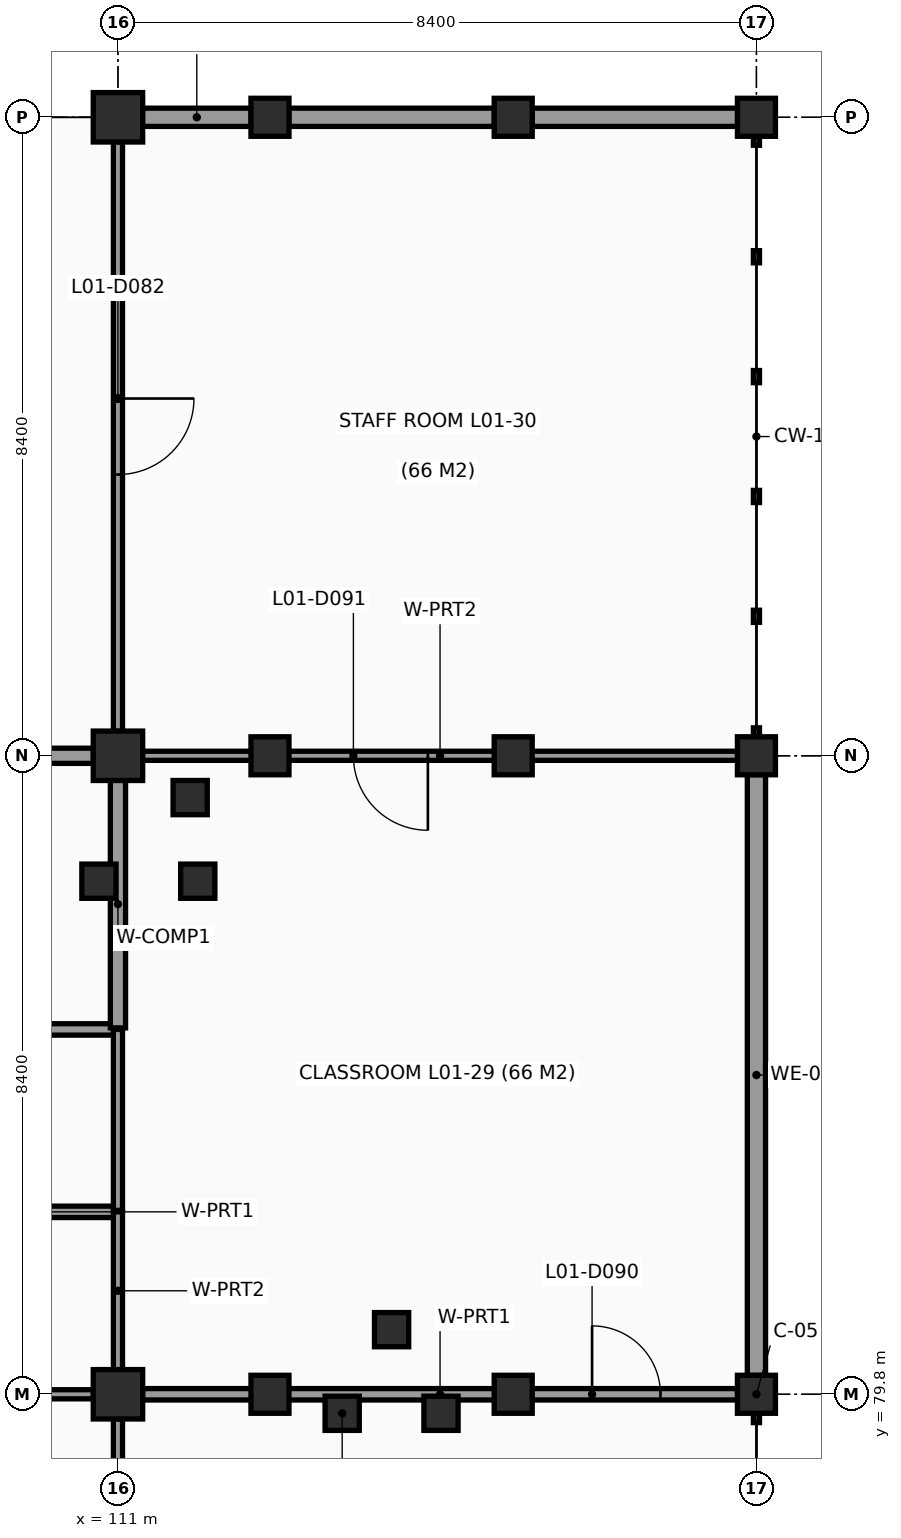
"""IFC4 building model, lengths in metres.
Left out: names, types, materials, properties, quantities, classifications, styles, units other than length and angle.
Written with IfcOpenShell. Run it as: python <this file> out.ifc"""

import sys

from ifc_helpers import new_model, si_unit, direction, frame, frame_2d, origin, origin_2d, place, context, subcontext, project, spatial, rectangle, extrude, element, fill, save


model = new_model("IFC4")
c1 = context("Model", 3, precision=1e-05, world=origin(), true_north=direction((0.0, 1.0)))
c2 = subcontext(c1, "Body", "Model", "MODEL_VIEW")
j1 = project(units=[si_unit("LENGTHUNIT", "METRE"), si_unit("PLANEANGLEUNIT", "RADIAN")], contexts=[c1])
p1 = place(None, origin())
s1 = spatial("IfcSite", under=j1, at=p1, CompositionType="ELEMENT")
p2 = place(p1, origin())
s2 = spatial("IfcBuilding", under=s1, at=p2, CompositionType="ELEMENT")
p3 = place(p2, frame((0.0, 0.0, 4.2)))
s3 = spatial("IfcBuildingStorey", under=s2, at=p3, CompositionType="ELEMENT", Elevation=4.2)
for number, where, z_axis, x_axis in (
    (1, (111.0, 79.8, 0.0), (0.0, 0.0, 1.0), (1.0, 0.0, 0.0)),
    (2, (111.0, 88.2, 0.0), (0.0, 0.0, 1.0), (1.0, 0.0, 0.0)),
    (3, (111.0, 96.6, 0.0), (0.0, 0.0, 1.0), (1.0, 0.0, 0.0)),
):
    element("IfcColumn", number, at=place(p3, frame(where, z_axis=z_axis, x_axis=x_axis)), inside=s3, PredefinedType="COLUMN", context=c2, shape_type="SweptSolid", body=[
        extrude(rectangle(XDim=0.65, YDim=0.65, at=origin_2d()), origin(), (0.0, 0.0, 1.0), 3.6),
    ])
for number, where, z_axis, x_axis in (
    (4, (119.4, 79.8, 0.0), (0.0, 0.0, 1.0), (1.0, 0.0, 0.0)),
    (5, (119.4, 88.2, 0.0), (0.0, 0.0, 1.0), (1.0, 0.0, 0.0)),
    (6, (119.4, 96.6, 0.0), (0.0, 0.0, 1.0), (1.0, 0.0, 0.0)),
    (7, (116.2, 79.8, 0.0), (0.0, 0.0, 1.0), (1.0, 0.0, 0.0)),
    (8, (116.2, 88.2, 0.0), (0.0, 0.0, 1.0), (1.0, 0.0, 0.0)),
    (9, (116.2, 96.6, 0.0), (0.0, 0.0, 1.0), (1.0, 0.0, 0.0)),
    (10, (113.0, 79.8, 0.0), (0.0, 0.0, 1.0), (1.0, 0.0, 0.0)),
    (11, (113.0, 88.2, 0.0), (0.0, 0.0, 1.0), (1.0, 0.0, 0.0)),
    (12, (113.0, 96.6, 0.0), (0.0, 0.0, 1.0), (1.0, 0.0, 0.0)),
):
    element("IfcColumn", number, at=place(p3, frame(where, z_axis=z_axis, x_axis=x_axis)), inside=s3, PredefinedType="COLUMN", context=c2, shape_type="SweptSolid", body=[
        extrude(rectangle(XDim=0.5, YDim=0.5, at=origin_2d()), origin(), (0.0, 0.0, 1.0), 3.6),
    ])
for number, where, z_axis, x_axis in (
    (13, (113.95, 79.55, 0.0), (0.0, 0.0, 1.0), (1.0, 0.0, 0.0)),
    (14, (115.25, 79.55, 0.0), (0.0, 0.0, 1.0), (1.0, 0.0, 0.0)),
    (15, (114.6, 80.65, 0.0), (0.0, 0.0, 1.0), (1.0, 0.0, 0.0)),
    (16, (110.75, 86.55, 0.0), (0.0, 0.0, 1.0), (1.0, 0.0, 0.0)),
    (17, (112.05, 86.55, 0.0), (0.0, 0.0, 1.0), (1.0, 0.0, 0.0)),
    (18, (111.95, 87.65, 0.0), (0.0, 0.0, 1.0), (1.0, 0.0, 0.0)),
):
    element("IfcColumn", number, at=place(p3, frame(where, z_axis=z_axis, x_axis=x_axis)), inside=s3, PredefinedType="COLUMN", context=c2, shape_type="SweptSolid", body=[
        extrude(rectangle(XDim=0.45, YDim=0.45, at=origin_2d()), origin(), (0.0, 0.0, 1.0), 3.6),
    ])
p4 = place(p3, frame((111.323, 96.6, 0.0), z_axis=(0.0, 0.0, 1.0), x_axis=(1.0, 0.0, 0.0)))
e19 = element("IfcWall", 19, at=p4, inside=s3, PredefinedType="SOLIDWALL", context=c2, shape_type="SweptSolid", body=[
    extrude(rectangle(XDim=1.429, YDim=0.24, at=frame_2d((0.714, 0.0))), origin(), (0.0, 0.0, 1.0), 2.57),
])
p5 = place(p3, frame((113.248, 96.6, 0.0), z_axis=(0.0, 0.0, 1.0), x_axis=(1.0, 0.0, 0.0)))
e20 = element("IfcWall", 20, at=p5, inside=s3, PredefinedType="SOLIDWALL", context=c2, shape_type="SweptSolid", body=[
    extrude(rectangle(XDim=2.704, YDim=0.24, at=frame_2d((1.352, 0.0))), origin(), (0.0, 0.0, 1.0), 2.57),
])
p6 = place(p3, frame((116.448, 96.6, 0.0), z_axis=(0.0, 0.0, 1.0), x_axis=(1.0, 0.0, 0.0)))
e21 = element("IfcWall", 21, at=p6, inside=s3, PredefinedType="SOLIDWALL", context=c2, shape_type="SweptSolid", body=[
    extrude(rectangle(XDim=2.704, YDim=0.24, at=frame_2d((1.352, 0.0))), origin(), (0.0, 0.0, 1.0), 2.57),
])
p7 = place(p3, frame((119.4, 87.952, 0.0), z_axis=(0.0, 0.0, 1.0), x_axis=(0.0, -1.0, 0.0)))
e22 = element("IfcWall", 22, at=p7, inside=s3, PredefinedType="SOLIDWALL", context=c2, shape_type="SweptSolid", body=[
    extrude(rectangle(XDim=7.904, YDim=0.24, at=frame_2d((3.952, 0.0))), origin(), (0.0, 0.0, 1.0), 2.62),
])
p8 = place(p3, frame((110.677, 79.8, 0.0), z_axis=(0.0, 0.0, 1.0), x_axis=(-1.0, 0.0, 0.0)))
e23 = element("IfcWall", 23, at=p8, inside=s3, PredefinedType="PARTITIONING", context=c2, shape_type="SweptSolid", body=[
    extrude(rectangle(XDim=3.857, YDim=0.12, at=frame_2d((1.928, 0.0))), origin(), (0.0, 0.0, 1.0), 2.87),
])
p9 = place(p3, frame((106.82, 82.2, 0.0), z_axis=(0.0, 0.0, 1.0), x_axis=(1.0, 0.0, 0.0)))
e24 = element("IfcWall", 24, at=p9, inside=s3, PredefinedType="PARTITIONING", context=c2, shape_type="SweptSolid", body=[
    extrude(rectangle(XDim=4.18, YDim=0.15, at=frame_2d((2.09, 0.0))), origin(), (0.0, 0.0, 1.0), 2.72),
])
p10 = place(p9, frame((1.065, 0.0, 0.0)))
e25 = element("IfcOpeningElement", 25, at=p10, cuts=e24, PredefinedType="OPENING", context=c2, shape_type="SweptSolid", body=[
    extrude(rectangle(XDim=2.05, YDim=2.35, at=frame_2d((1.025, 1.175))), frame((0.0, 0.085, 0.0), z_axis=(0.0, -1.0, 0.0), x_axis=(1.0, 0.0, 0.0)), (0.0, 0.0, 1.0), 0.17),
])
p11 = place(p3, frame((111.0, 82.2, 0.0), z_axis=(0.0, 0.0, 1.0), x_axis=(0.0, -1.0, 0.0)))
e26 = element("IfcWall", 26, at=p11, inside=s3, PredefinedType="PARTITIONING", context=c2, shape_type="SweptSolid", body=[
    extrude(rectangle(XDim=2.077, YDim=0.12, at=frame_2d((1.039, 0.0))), origin(), (0.0, 0.0, 1.0), 2.72),
])
p12 = place(p3, frame((106.8, 84.6, 0.0), z_axis=(0.0, 0.0, 1.0), x_axis=(1.0, 0.0, 0.0)))
e27 = element("IfcWall", 27, at=p12, inside=s3, PredefinedType="PARTITIONING", context=c2, shape_type="SweptSolid", body=[
    extrude(rectangle(XDim=4.2, YDim=0.15, at=frame_2d((2.1, 0.0))), origin(), (0.0, 0.0, 1.0), 2.72),
])
p13 = place(p12, frame((1.65, 0.0, 0.0)))
e28 = element("IfcOpeningElement", 28, at=p13, cuts=e27, PredefinedType="OPENING", context=c2, shape_type="SweptSolid", body=[
    extrude(rectangle(XDim=0.9, YDim=2.05, at=frame_2d((0.45, 1.025))), frame((0.0, 0.085, 0.0), z_axis=(0.0, -1.0, 0.0), x_axis=(1.0, 0.0, 0.0)), (0.0, 0.0, 1.0), 0.17),
])
p14 = place(p3, frame((111.0, 84.6, 0.0), z_axis=(0.0, 0.0, 1.0), x_axis=(0.0, -1.0, 0.0)))
e29 = element("IfcWall", 29, at=p14, inside=s3, PredefinedType="PARTITIONING", context=c2, shape_type="SweptSolid", body=[
    extrude(rectangle(XDim=2.38, YDim=0.12, at=frame_2d((1.19, 0.0))), origin(), (0.0, 0.0, 1.0), 2.72),
])
p15 = place(p3, frame((106.82, 88.2, 0.0), z_axis=(0.0, 0.0, 1.0), x_axis=(1.0, 0.0, 0.0)))
e30 = element("IfcWall", 30, at=p15, inside=s3, PredefinedType="PARTITIONING", context=c2, shape_type="SweptSolid", body=[
    extrude(rectangle(XDim=3.857, YDim=0.2, at=frame_2d((1.928, 0.0))), origin(), (0.0, 0.0, 1.0), 2.93),
])
p16 = place(p15, frame((0.654, 0.0, 0.0)))
e31 = element("IfcOpeningElement", 31, at=p16, cuts=e30, PredefinedType="OPENING", context=c2, shape_type="SweptSolid", body=[
    extrude(rectangle(XDim=1.25, YDim=2.15, at=frame_2d((0.625, 1.075))), frame((0.0, 0.11, 0.0), z_axis=(0.0, -1.0, 0.0), x_axis=(1.0, 0.0, 0.0)), (0.0, 0.0, 1.0), 0.22),
])
p17 = place(p3, frame((111.0, 87.877, 0.0), z_axis=(0.0, 0.0, 1.0), x_axis=(0.0, -1.0, 0.0)))
e32 = element("IfcWall", 32, at=p17, inside=s3, PredefinedType="PARTITIONING", context=c2, shape_type="SweptSolid", body=[
    extrude(rectangle(XDim=3.257, YDim=0.2, at=frame_2d((1.628, 0.0))), origin(), (0.0, 0.0, 1.0), 2.72),
])
p18 = place(p3, frame((111.0, 79.477, 0.0), z_axis=(0.0, 0.0, 1.0), x_axis=(0.0, -1.0, 0.0)))
e33 = element("IfcWall", 33, at=p18, inside=s3, PredefinedType="PARTITIONING", context=c2, shape_type="SweptSolid", body=[
    extrude(rectangle(XDim=5.304, YDim=0.12, at=frame_2d((2.652, 0.0))), origin(), (0.0, 0.0, 1.0), 2.72),
])
p19 = place(p3, frame((111.0, 96.277, 0.0), z_axis=(0.0, 0.0, 1.0), x_axis=(0.0, -1.0, 0.0)))
e34 = element("IfcWall", 34, at=p19, inside=s3, PredefinedType="PARTITIONING", context=c2, shape_type="SweptSolid", body=[
    extrude(rectangle(XDim=7.754, YDim=0.12, at=frame_2d((3.877, 0.0))), origin(), (0.0, 0.0, 1.0), 2.72),
])
p20 = place(p19, frame((3.377, 0.0, 0.0)))
e35 = element("IfcOpeningElement", 35, at=p20, cuts=e34, PredefinedType="OPENING", context=c2, shape_type="SweptSolid", body=[
    extrude(rectangle(XDim=1.0, YDim=2.1, at=frame_2d((0.5, 1.05))), frame((0.0, 0.07, 0.0), z_axis=(0.0, -1.0, 0.0), x_axis=(1.0, 0.0, 0.0)), (0.0, 0.0, 1.0), 0.14),
])
p21 = place(p3, frame((111.323, 79.8, 0.0), z_axis=(0.0, 0.0, 1.0), x_axis=(1.0, 0.0, 0.0)))
e36 = element("IfcWall", 36, at=p21, inside=s3, PredefinedType="PARTITIONING", context=c2, shape_type="SweptSolid", body=[
    extrude(rectangle(XDim=7.829, YDim=0.15, at=frame_2d((3.915, 0.0))), origin(), (0.0, 0.0, 1.0), 2.87),
])
p22 = place(p21, frame((5.915, 0.0, 0.0)))
e37 = element("IfcOpeningElement", 37, at=p22, cuts=e36, PredefinedType="OPENING", context=c2, shape_type="SweptSolid", body=[
    extrude(rectangle(XDim=0.9, YDim=2.05, at=frame_2d((0.45, 1.025))), frame((0.0, 0.085, 0.0), z_axis=(0.0, -1.0, 0.0), x_axis=(1.0, 0.0, 0.0)), (0.0, 0.0, 1.0), 0.17),
])
p23 = place(p3, frame((111.323, 88.2, 0.0), z_axis=(0.0, 0.0, 1.0), x_axis=(1.0, 0.0, 0.0)))
e38 = element("IfcWall", 38, at=p23, inside=s3, PredefinedType="PARTITIONING", context=c2, shape_type="SweptSolid", body=[
    extrude(rectangle(XDim=7.829, YDim=0.12, at=frame_2d((3.915, 0.0))), origin(), (0.0, 0.0, 1.0), 2.93),
])
p24 = place(p23, frame((2.774, 0.0, 0.0)))
e39 = element("IfcOpeningElement", 39, at=p24, cuts=e38, PredefinedType="OPENING", context=c2, shape_type="SweptSolid", body=[
    extrude(rectangle(XDim=0.98, YDim=2.12, at=frame_2d((0.49, 1.06))), frame((0.0, 0.07, 0.0), z_axis=(0.0, -1.0, 0.0), x_axis=(1.0, 0.0, 0.0)), (0.0, 0.0, 1.0), 0.14),
])
p25 = place(p20, origin())
e40 = element("IfcDoor", 40, at=p25, inside=s3, OperationType="SINGLE_SWING_LEFT", PredefinedType="DOOR", context=c2, shape_type="SweptSolid", body=[
    extrude(rectangle(XDim=1.0, YDim=2.1, at=frame_2d((0.5, 1.05))), frame((0.0, 0.025, 0.0), z_axis=(0.0, -1.0, 0.0), x_axis=(1.0, 0.0, 0.0)), (0.0, 0.0, 1.0), 0.05),
])
fill(e35, e40)
p26 = place(p22, origin())
e41 = element("IfcDoor", 41, at=p26, inside=s3, OperationType="SINGLE_SWING_LEFT", PredefinedType="DOOR", context=c2, shape_type="SweptSolid", body=[
    extrude(rectangle(XDim=0.9, YDim=2.05, at=frame_2d((0.45, 1.025))), frame((0.0, 0.025, 0.0), z_axis=(0.0, -1.0, 0.0), x_axis=(1.0, 0.0, 0.0)), (0.0, 0.0, 1.0), 0.05),
])
fill(e37, e41)
p27 = place(p24, origin())
e42 = element("IfcDoor", 42, at=p27, inside=s3, OperationType="SINGLE_SWING_RIGHT", PredefinedType="DOOR", context=c2, shape_type="SweptSolid", body=[
    extrude(rectangle(XDim=0.98, YDim=2.12, at=frame_2d((0.49, 1.06))), frame((0.0, 0.025, 0.0), z_axis=(0.0, -1.0, 0.0), x_axis=(1.0, 0.0, 0.0)), (0.0, 0.0, 1.0), 0.05),
])
fill(e39, e42)
save(model, sys.argv[1])
